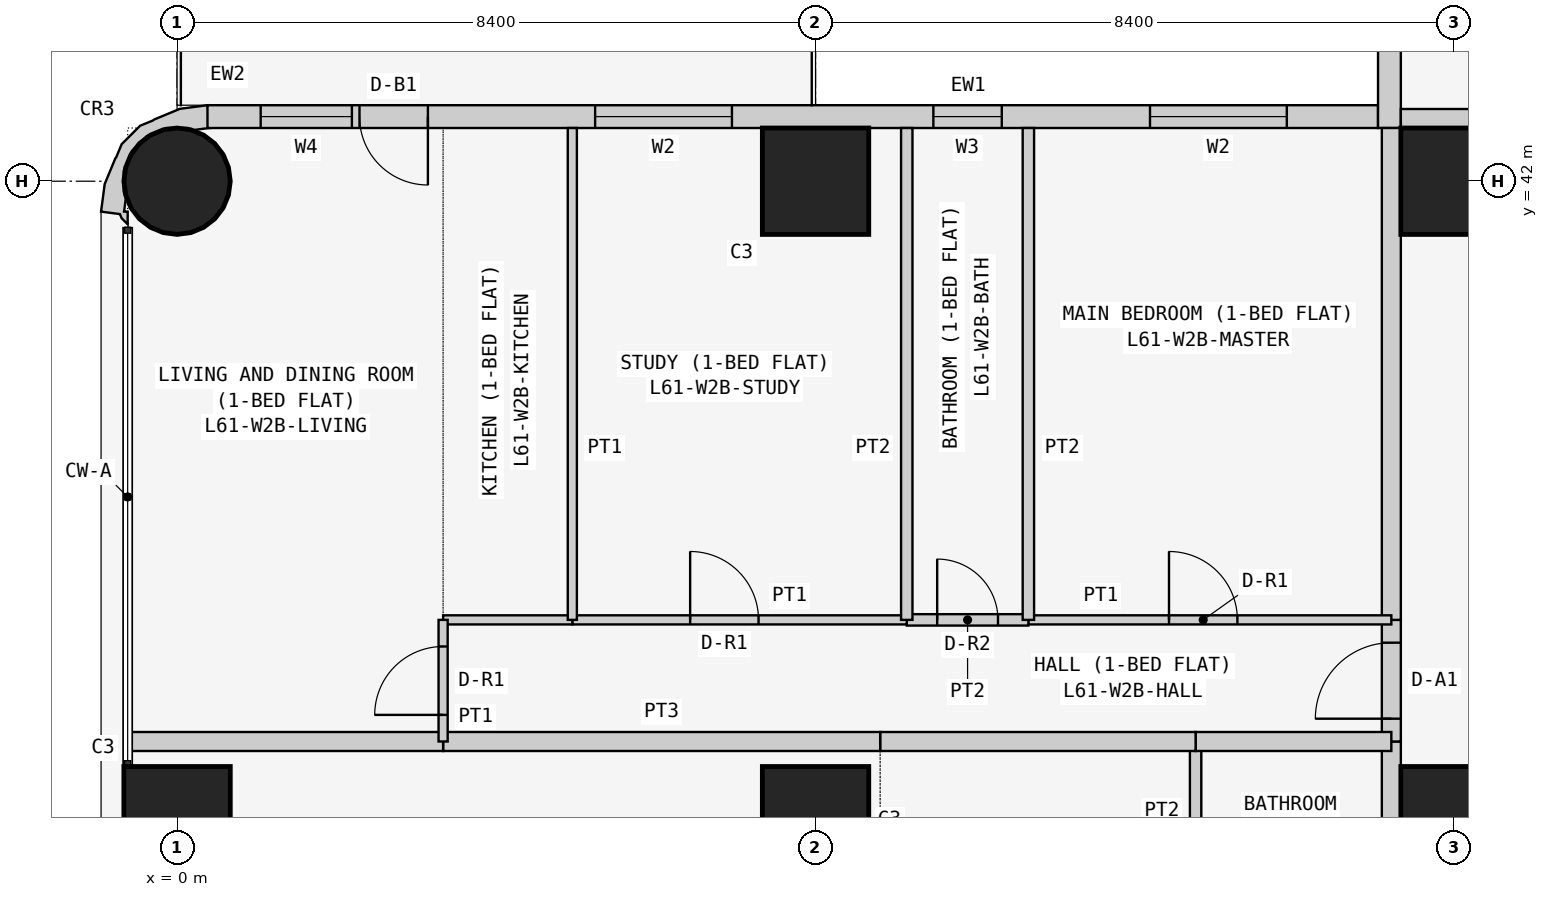
"""IFC4 building model, lengths in metres.
Left out: names, types, materials, properties, quantities, classifications, styles, units other than length and angle.
Written with IfcOpenShell. Run it as: python <this file> out.ifc"""

import sys

from ifc_helpers import new_model, si_unit, direction, frame, frame_2d, origin, origin_2d, place, context, subcontext, project, spatial, polyline, rectangle, circle, outline, extrude, element, fill, save


model = new_model("IFC4")
c1 = context("Model", 3, precision=1e-05, world=origin(), true_north=direction((0.0, 1.0)))
c2 = subcontext(c1, "Body", "Model", "MODEL_VIEW")
j1 = project(units=[si_unit("LENGTHUNIT", "METRE"), si_unit("PLANEANGLEUNIT", "RADIAN")], contexts=[c1])
p1 = place(None, origin())
s1 = spatial("IfcSite", under=j1, at=p1, CompositionType="ELEMENT")
p2 = place(p1, origin())
s2 = spatial("IfcBuilding", under=s1, at=p2, CompositionType="ELEMENT")
p3 = place(p2, frame((0.0, 0.0, 233.7)))
s3 = spatial("IfcBuildingStorey", under=s2, at=p3, CompositionType="ELEMENT", Elevation=233.7)
p4 = place(p3, frame((0.0, 33.6, 0.0), z_axis=(0.0, 0.0, 1.0), x_axis=(1.0, 0.0, 0.0)))
e1 = element("IfcColumn", 1, at=p4, inside=s3, PredefinedType="COLUMN", context=c2, shape_type="SweptSolid", body=[
    extrude(rectangle(XDim=1.4, YDim=1.4, at=origin_2d()), origin(), (0.0, 0.0, 1.0), 3.6),
])
p5 = place(p3, frame((0.0, 42.0, 0.0), z_axis=(0.0, 0.0, 1.0), x_axis=(1.0, 0.0, 0.0)))
e2 = element("IfcColumn", 2, at=p5, inside=s3, PredefinedType="COLUMN", context=c2, shape_type="SweptSolid", body=[
    extrude(circle(Radius=0.7, at=origin_2d()), origin(), (0.0, 0.0, 1.0), 3.6),
])
for number, where, z_axis, x_axis in (
    (3, (8.4, 33.6, 0.0), (0.0, 0.0, 1.0), (1.0, 0.0, 0.0)),
    (4, (8.4, 42.0, 0.0), (0.0, 0.0, 1.0), (1.0, 0.0, 0.0)),
    (5, (16.8, 33.6, 0.0), (0.0, 0.0, 1.0), (1.0, 0.0, 0.0)),
    (6, (16.8, 42.0, 0.0), (0.0, 0.0, 1.0), (1.0, 0.0, 0.0)),
):
    element("IfcColumn", number, at=place(p3, frame(where, z_axis=z_axis, x_axis=x_axis)), inside=s3, PredefinedType="COLUMN", context=c2, shape_type="SweptSolid", body=[
        extrude(rectangle(XDim=1.4, YDim=1.4, at=origin_2d()), origin(), (0.0, 0.0, 1.0), 3.6),
    ])
p6 = place(p3, frame((15.8, 42.85, 0.0), z_axis=(0.0, 0.0, 1.0), x_axis=(-1.0, 0.0, 0.0)))
e7 = element("IfcWall", 7, at=p6, inside=s3, PredefinedType="SOLIDWALL", context=c2, shape_type="SweptSolid", body=[
    extrude(rectangle(XDim=15.4, YDim=0.3, at=frame_2d((7.7, 0.0))), origin(), (0.0, 0.0, 1.0), 3.45),
])
p7 = place(p6, frame((1.2, 0.0, 0.9)))
e8 = element("IfcOpeningElement", 8, at=p7, cuts=e7, PredefinedType="OPENING", context=c2, shape_type="SweptSolid", body=[
    extrude(rectangle(XDim=1.8, YDim=1.5, at=frame_2d((0.9, 0.75))), frame((0.0, 0.16, 0.0), z_axis=(0.0, -1.0, 0.0), x_axis=(1.0, 0.0, 0.0)), (0.0, 0.0, 1.0), 0.32),
])
p8 = place(p6, frame((4.95, 0.0, 1.5)))
e9 = element("IfcOpeningElement", 9, at=p8, cuts=e7, PredefinedType="OPENING", context=c2, shape_type="SweptSolid", body=[
    extrude(rectangle(XDim=0.9, YDim=0.7, at=frame_2d((0.45, 0.35))), frame((0.0, 0.16, 0.0), z_axis=(0.0, -1.0, 0.0), x_axis=(1.0, 0.0, 0.0)), (0.0, 0.0, 1.0), 0.32),
])
p9 = place(p6, frame((8.5, 0.0, 0.9)))
e10 = element("IfcOpeningElement", 10, at=p9, cuts=e7, PredefinedType="OPENING", context=c2, shape_type="SweptSolid", body=[
    extrude(rectangle(XDim=1.8, YDim=1.5, at=frame_2d((0.9, 0.75))), frame((0.0, 0.16, 0.0), z_axis=(0.0, -1.0, 0.0), x_axis=(1.0, 0.0, 0.0)), (0.0, 0.0, 1.0), 0.32),
])
p10 = place(p6, frame((12.5, 0.0, 0.0)))
e11 = element("IfcOpeningElement", 11, at=p10, cuts=e7, PredefinedType="OPENING", context=c2, shape_type="SweptSolid", body=[
    extrude(rectangle(XDim=0.9, YDim=2.4, at=frame_2d((0.45, 1.2))), frame((0.0, 0.16, 0.0), z_axis=(0.0, -1.0, 0.0), x_axis=(1.0, 0.0, 0.0)), (0.0, 0.0, 1.0), 0.32),
])
p11 = place(p6, frame((13.5, 0.0, 0.9)))
e12 = element("IfcOpeningElement", 12, at=p11, cuts=e7, PredefinedType="OPENING", context=c2, shape_type="SweptSolid", body=[
    extrude(rectangle(XDim=1.2, YDim=1.5, at=frame_2d((0.6, 0.75))), frame((0.0, 0.16, 0.0), z_axis=(0.0, -1.0, 0.0), x_axis=(1.0, 0.0, 0.0)), (0.0, 0.0, 1.0), 0.32),
])
p12 = place(p3, frame((15.95, 50.0, 0.0), z_axis=(0.0, 0.0, 1.0), x_axis=(0.0, -1.0, 0.0)))
e13 = element("IfcWall", 13, at=p12, inside=s3, PredefinedType="SOLIDWALL", context=c2, shape_type="SweptSolid", body=[
    extrude(rectangle(XDim=7.3, YDim=0.3, at=frame_2d((3.65, 0.0))), origin(), (0.0, 0.0, 1.0), 3.45),
])
p13 = place(p12, frame((3.1, 0.0, 0.9)))
e14 = element("IfcOpeningElement", 14, at=p13, cuts=e13, PredefinedType="OPENING", context=c2, shape_type="SweptSolid", body=[
    extrude(rectangle(XDim=2.4, YDim=1.5, at=frame_2d((1.2, 0.75))), frame((0.0, 0.16, 0.0), z_axis=(0.0, -1.0, 0.0), x_axis=(1.0, 0.0, 0.0)), (0.0, 0.0, 1.0), 0.32),
])
p14 = place(p12, frame((0.75, 0.0, 0.9)))
e15 = element("IfcOpeningElement", 15, at=p14, cuts=e13, PredefinedType="OPENING", context=c2, shape_type="SweptSolid", body=[
    extrude(rectangle(XDim=1.2, YDim=1.5, at=frame_2d((0.6, 0.75))), frame((0.0, 0.16, 0.0), z_axis=(0.0, -1.0, 0.0), x_axis=(1.0, 0.0, 0.0)), (0.0, 0.0, 1.0), 0.32),
])
p15 = place(p3, frame((0.29, 42.724, 0.0), z_axis=(0.0, 0.0, 1.0), x_axis=(-0.898030234854, 0.439933741929, 0.0)))
e16 = element("IfcWall", 16, at=p15, inside=s3, PredefinedType="SOLIDWALL", context=c2, shape_type="SweptSolid", body=[
    extrude(outline(polyline([(-0.145, -0.044), (0.022, -0.296), (0.327, -0.094), (0.568, 0.18), (0.578, 0.199), (0.7, 0.338), (0.811, 0.661), (0.799, 0.846), (0.803, 0.866), (0.78, 1.231), (0.664, 1.577), (0.426, 1.497), (0.382, 1.536), (0.276, 1.572), (0.349, 1.423), (0.392, 1.444), (0.453, 1.261), (0.51, 1.211), (0.632, 0.961), (0.65, 0.683), (0.56, 0.419), (0.375, 0.21), (0.125, 0.087), (0.05, 0.082), (-0.127, -0.035), (-0.145, -0.044)])), origin(), (0.0, 0.0, 1.0), 3.45),
])
p16 = place(p3, frame((16.1, 42.825, 0.0), z_axis=(0.0, 0.0, 1.0), x_axis=(1.0, 0.0, 0.0)))
e17 = element("IfcWall", 17, at=p16, inside=s3, PredefinedType="PARTITIONING", context=c2, shape_type="SweptSolid", body=[
    extrude(rectangle(XDim=6.871, YDim=0.25, at=frame_2d((3.436, 0.0))), origin(), (0.0, 0.0, 1.0), 3.45),
])
p17 = place(p3, frame((15.975, 32.0, 0.0), z_axis=(0.0, 0.0, 1.0), x_axis=(0.0, 1.0, 0.0)))
e18 = element("IfcWall", 18, at=p17, inside=s3, PredefinedType="PARTITIONING", context=c2, shape_type="SweptSolid", body=[
    extrude(rectangle(XDim=2.629, YDim=0.25, at=frame_2d((1.314, 0.0))), origin(), (0.0, 0.0, 1.0), 3.45),
])
p18 = place(p3, frame((15.975, 34.629, 0.0), z_axis=(0.0, 0.0, 1.0), x_axis=(0.0, 1.0, 0.0)))
e19 = element("IfcWall", 19, at=p18, inside=s3, PredefinedType="PARTITIONING", context=c2, shape_type="SweptSolid", body=[
    extrude(rectangle(XDim=1.6, YDim=0.25, at=frame_2d((0.8, 0.0))), origin(), (0.0, 0.0, 1.0), 3.45),
])
p19 = place(p18, frame((0.3, 0.0, 0.0)))
e20 = element("IfcOpeningElement", 20, at=p19, cuts=e19, PredefinedType="OPENING", context=c2, shape_type="SweptSolid", body=[
    extrude(rectangle(XDim=1.0, YDim=2.1, at=frame_2d((0.5, 1.05))), frame((0.0, 0.135, 0.0), z_axis=(0.0, -1.0, 0.0), x_axis=(1.0, 0.0, 0.0)), (0.0, 0.0, 1.0), 0.27),
])
p20 = place(p3, frame((15.975, 36.229, 0.0), z_axis=(0.0, 0.0, 1.0), x_axis=(0.0, 1.0, 0.0)))
e21 = element("IfcWall", 21, at=p20, inside=s3, PredefinedType="PARTITIONING", context=c2, shape_type="SweptSolid", body=[
    extrude(rectangle(XDim=6.471, YDim=0.25, at=frame_2d((3.235, 0.0))), origin(), (0.0, 0.0, 1.0), 3.45),
])
p21 = place(p3, frame((13.4, 32.0, 0.0), z_axis=(0.0, 0.0, 1.0), x_axis=(0.0, 1.0, 0.0)))
e22 = element("IfcWall", 22, at=p21, inside=s3, PredefinedType="PARTITIONING", context=c2, shape_type="SweptSolid", body=[
    extrude(rectangle(XDim=2.629, YDim=0.15, at=frame_2d((1.314, 0.0))), origin(), (0.0, 0.0, 1.0), 3.45),
])
p22 = place(p3, frame((13.4, 34.629, 0.0), z_axis=(0.0, 0.0, 1.0), x_axis=(1.0, 0.0, 0.0)))
e23 = element("IfcWall", 23, at=p22, inside=s3, PredefinedType="PARTITIONING", context=c2, shape_type="SweptSolid", body=[
    extrude(rectangle(XDim=2.575, YDim=0.25, at=frame_2d((1.288, 0.0))), origin(), (0.0, 0.0, 1.0), 3.45),
])
p23 = place(p3, frame((9.25, 34.629, 0.0), z_axis=(0.0, 0.0, 1.0), x_axis=(1.0, 0.0, 0.0)))
e24 = element("IfcWall", 24, at=p23, inside=s3, PredefinedType="PARTITIONING", context=c2, shape_type="SweptSolid", body=[
    extrude(rectangle(XDim=4.15, YDim=0.25, at=frame_2d((2.075, 0.0))), origin(), (0.0, 0.0, 1.0), 3.45),
])
p24 = place(p3, frame((3.5, 34.629, 0.0), z_axis=(0.0, 0.0, 1.0), x_axis=(1.0, 0.0, 0.0)))
e25 = element("IfcWall", 25, at=p24, inside=s3, PredefinedType="PARTITIONING", context=c2, shape_type="SweptSolid", body=[
    extrude(rectangle(XDim=5.75, YDim=0.25, at=frame_2d((2.875, 0.0))), origin(), (0.0, 0.0, 1.0), 3.45),
])
p25 = place(p3, frame((-0.65, 34.629, 0.0), z_axis=(0.0, 0.0, 1.0), x_axis=(1.0, 0.0, 0.0)))
e26 = element("IfcWall", 26, at=p25, inside=s3, PredefinedType="PARTITIONING", context=c2, shape_type="SweptSolid", body=[
    extrude(rectangle(XDim=4.15, YDim=0.25, at=frame_2d((2.075, 0.0))), origin(), (0.0, 0.0, 1.0), 3.45),
])
p26 = place(p3, frame((11.2, 36.229, 0.0), z_axis=(0.0, 0.0, 1.0), x_axis=(1.0, 0.0, 0.0)))
e27 = element("IfcWall", 27, at=p26, inside=s3, PredefinedType="PARTITIONING", context=c2, shape_type="SweptSolid", body=[
    extrude(rectangle(XDim=4.775, YDim=0.12, at=frame_2d((2.388, 0.0))), origin(), (0.0, 0.0, 1.0), 3.45),
])
p27 = place(p26, frame((1.85, 0.0, 0.0)))
e28 = element("IfcOpeningElement", 28, at=p27, cuts=e27, PredefinedType="OPENING", context=c2, shape_type="SweptSolid", body=[
    extrude(rectangle(XDim=0.9, YDim=2.1, at=frame_2d((0.45, 1.05))), frame((0.0, 0.07, 0.0), z_axis=(0.0, -1.0, 0.0), x_axis=(1.0, 0.0, 0.0)), (0.0, 0.0, 1.0), 0.14),
])
p28 = place(p3, frame((9.6, 36.229, 0.0), z_axis=(0.0, 0.0, 1.0), x_axis=(1.0, 0.0, 0.0)))
e29 = element("IfcWall", 29, at=p28, inside=s3, PredefinedType="PARTITIONING", context=c2, shape_type="SweptSolid", body=[
    extrude(rectangle(XDim=1.6, YDim=0.15, at=frame_2d((0.8, 0.0))), origin(), (0.0, 0.0, 1.0), 3.45),
])
p29 = place(p28, frame((0.4, 0.0, 0.0)))
e30 = element("IfcOpeningElement", 30, at=p29, cuts=e29, PredefinedType="OPENING", context=c2, shape_type="SweptSolid", body=[
    extrude(rectangle(XDim=0.8, YDim=2.1, at=frame_2d((0.4, 1.05))), frame((0.0, 0.085, 0.0), z_axis=(0.0, -1.0, 0.0), x_axis=(1.0, 0.0, 0.0)), (0.0, 0.0, 1.0), 0.17),
])
p30 = place(p3, frame((5.2, 36.229, 0.0), z_axis=(0.0, 0.0, 1.0), x_axis=(1.0, 0.0, 0.0)))
e31 = element("IfcWall", 31, at=p30, inside=s3, PredefinedType="PARTITIONING", context=c2, shape_type="SweptSolid", body=[
    extrude(rectangle(XDim=4.4, YDim=0.12, at=frame_2d((2.2, 0.0))), origin(), (0.0, 0.0, 1.0), 3.45),
])
p31 = place(p30, frame((1.55, 0.0, 0.0)))
e32 = element("IfcOpeningElement", 32, at=p31, cuts=e31, PredefinedType="OPENING", context=c2, shape_type="SweptSolid", body=[
    extrude(rectangle(XDim=0.9, YDim=2.1, at=frame_2d((0.45, 1.05))), frame((0.0, 0.07, 0.0), z_axis=(0.0, -1.0, 0.0), x_axis=(1.0, 0.0, 0.0)), (0.0, 0.0, 1.0), 0.14),
])
p32 = place(p3, frame((3.5, 36.229, 0.0), z_axis=(0.0, 0.0, 1.0), x_axis=(1.0, 0.0, 0.0)))
e33 = element("IfcWall", 33, at=p32, inside=s3, PredefinedType="PARTITIONING", context=c2, shape_type="SweptSolid", body=[
    extrude(rectangle(XDim=1.7, YDim=0.12, at=frame_2d((0.85, 0.0))), origin(), (0.0, 0.0, 1.0), 3.45),
])
p33 = place(p3, frame((3.5, 34.629, 0.0), z_axis=(0.0, 0.0, 1.0), x_axis=(0.0, 1.0, 0.0)))
e34 = element("IfcWall", 34, at=p33, inside=s3, PredefinedType="PARTITIONING", context=c2, shape_type="SweptSolid", body=[
    extrude(rectangle(XDim=1.6, YDim=0.12, at=frame_2d((0.8, 0.0))), origin(), (0.0, 0.0, 1.0), 3.45),
])
p34 = place(p33, frame((0.35, 0.0, 0.0)))
e35 = element("IfcOpeningElement", 35, at=p34, cuts=e34, PredefinedType="OPENING", context=c2, shape_type="SweptSolid", body=[
    extrude(rectangle(XDim=0.9, YDim=2.1, at=frame_2d((0.45, 1.05))), frame((0.0, 0.07, 0.0), z_axis=(0.0, -1.0, 0.0), x_axis=(1.0, 0.0, 0.0)), (0.0, 0.0, 1.0), 0.14),
])
for number, where, z_axis, x_axis in (
    (36, (11.2, 36.229, 0.0), (0.0, 0.0, 1.0), (0.0, 1.0, 0.0)),
    (37, (9.6, 36.229, 0.0), (0.0, 0.0, 1.0), (0.0, 1.0, 0.0)),
):
    element("IfcWall", number, at=place(p3, frame(where, z_axis=z_axis, x_axis=x_axis)), inside=s3, PredefinedType="PARTITIONING", context=c2, shape_type="SweptSolid", body=[
        extrude(rectangle(XDim=6.471, YDim=0.15, at=frame_2d((3.235, 0.0))), origin(), (0.0, 0.0, 1.0), 3.45),
    ])
p35 = place(p3, frame((5.2, 36.229, 0.0), z_axis=(0.0, 0.0, 1.0), x_axis=(0.0, 1.0, 0.0)))
e38 = element("IfcWall", 38, at=p35, inside=s3, PredefinedType="PARTITIONING", context=c2, shape_type="SweptSolid", body=[
    extrude(rectangle(XDim=6.471, YDim=0.12, at=frame_2d((3.235, 0.0))), origin(), (0.0, 0.0, 1.0), 3.45),
])
p36 = place(p7, origin())
e39 = element("IfcWindow", 39, at=p36, inside=s3, PartitioningType="SINGLE_PANEL", PredefinedType="WINDOW", context=c2, shape_type="SweptSolid", body=[
    extrude(rectangle(XDim=1.8, YDim=1.5, at=frame_2d((0.9, 0.75))), frame((0.0, 0.03, 0.0), z_axis=(0.0, -1.0, 0.0), x_axis=(1.0, 0.0, 0.0)), (0.0, 0.0, 1.0), 0.06),
])
fill(e8, e39)
p37 = place(p8, origin())
e40 = element("IfcWindow", 40, at=p37, inside=s3, PartitioningType="SINGLE_PANEL", PredefinedType="WINDOW", context=c2, shape_type="SweptSolid", body=[
    extrude(rectangle(XDim=0.9, YDim=0.7, at=frame_2d((0.45, 0.35))), frame((0.0, 0.03, 0.0), z_axis=(0.0, -1.0, 0.0), x_axis=(1.0, 0.0, 0.0)), (0.0, 0.0, 1.0), 0.06),
])
fill(e9, e40)
p38 = place(p9, origin())
e41 = element("IfcWindow", 41, at=p38, inside=s3, PartitioningType="SINGLE_PANEL", PredefinedType="WINDOW", context=c2, shape_type="SweptSolid", body=[
    extrude(rectangle(XDim=1.8, YDim=1.5, at=frame_2d((0.9, 0.75))), frame((0.0, 0.03, 0.0), z_axis=(0.0, -1.0, 0.0), x_axis=(1.0, 0.0, 0.0)), (0.0, 0.0, 1.0), 0.06),
])
fill(e10, e41)
p39 = place(p10, origin())
e42 = element("IfcDoor", 42, at=p39, inside=s3, OperationType="SINGLE_SWING_LEFT", PredefinedType="DOOR", context=c2, shape_type="SweptSolid", body=[
    extrude(rectangle(XDim=0.9, YDim=2.4, at=frame_2d((0.45, 1.2))), frame((0.0, 0.025, 0.0), z_axis=(0.0, -1.0, 0.0), x_axis=(1.0, 0.0, 0.0)), (0.0, 0.0, 1.0), 0.05),
])
fill(e11, e42)
p40 = place(p11, origin())
e43 = element("IfcWindow", 43, at=p40, inside=s3, PartitioningType="SINGLE_PANEL", PredefinedType="WINDOW", context=c2, shape_type="SweptSolid", body=[
    extrude(rectangle(XDim=1.2, YDim=1.5, at=frame_2d((0.6, 0.75))), frame((0.0, 0.03, 0.0), z_axis=(0.0, -1.0, 0.0), x_axis=(1.0, 0.0, 0.0)), (0.0, 0.0, 1.0), 0.06),
])
fill(e12, e43)
p41 = place(p19, origin())
e44 = element("IfcDoor", 44, at=p41, inside=s3, OperationType="SINGLE_SWING_LEFT", PredefinedType="DOOR", context=c2, shape_type="SweptSolid", body=[
    extrude(rectangle(XDim=1.0, YDim=2.1, at=frame_2d((0.5, 1.05))), frame((0.0, 0.025, 0.0), z_axis=(0.0, -1.0, 0.0), x_axis=(1.0, 0.0, 0.0)), (0.0, 0.0, 1.0), 0.05),
])
fill(e20, e44)
p42 = place(p27, origin())
e45 = element("IfcDoor", 45, at=p42, inside=s3, OperationType="SINGLE_SWING_LEFT", PredefinedType="DOOR", context=c2, shape_type="SweptSolid", body=[
    extrude(rectangle(XDim=0.9, YDim=2.1, at=frame_2d((0.45, 1.05))), frame((0.0, 0.025, 0.0), z_axis=(0.0, -1.0, 0.0), x_axis=(1.0, 0.0, 0.0)), (0.0, 0.0, 1.0), 0.05),
])
fill(e28, e45)
p43 = place(p29, origin())
e46 = element("IfcDoor", 46, at=p43, inside=s3, OperationType="SINGLE_SWING_LEFT", PredefinedType="DOOR", context=c2, shape_type="SweptSolid", body=[
    extrude(rectangle(XDim=0.8, YDim=2.1, at=frame_2d((0.4, 1.05))), frame((0.0, 0.025, 0.0), z_axis=(0.0, -1.0, 0.0), x_axis=(1.0, 0.0, 0.0)), (0.0, 0.0, 1.0), 0.05),
])
fill(e30, e46)
p44 = place(p31, origin())
e47 = element("IfcDoor", 47, at=p44, inside=s3, OperationType="SINGLE_SWING_LEFT", PredefinedType="DOOR", context=c2, shape_type="SweptSolid", body=[
    extrude(rectangle(XDim=0.9, YDim=2.1, at=frame_2d((0.45, 1.05))), frame((0.0, 0.025, 0.0), z_axis=(0.0, -1.0, 0.0), x_axis=(1.0, 0.0, 0.0)), (0.0, 0.0, 1.0), 0.05),
])
fill(e32, e47)
p45 = place(p34, origin())
e48 = element("IfcDoor", 48, at=p45, inside=s3, OperationType="SINGLE_SWING_LEFT", PredefinedType="DOOR", context=c2, shape_type="SweptSolid", body=[
    extrude(rectangle(XDim=0.9, YDim=2.1, at=frame_2d((0.45, 1.05))), frame((0.0, 0.025, 0.0), z_axis=(0.0, -1.0, 0.0), x_axis=(1.0, 0.0, 0.0)), (0.0, 0.0, 1.0), 0.05),
])
fill(e35, e48)
save(model, sys.argv[1])
